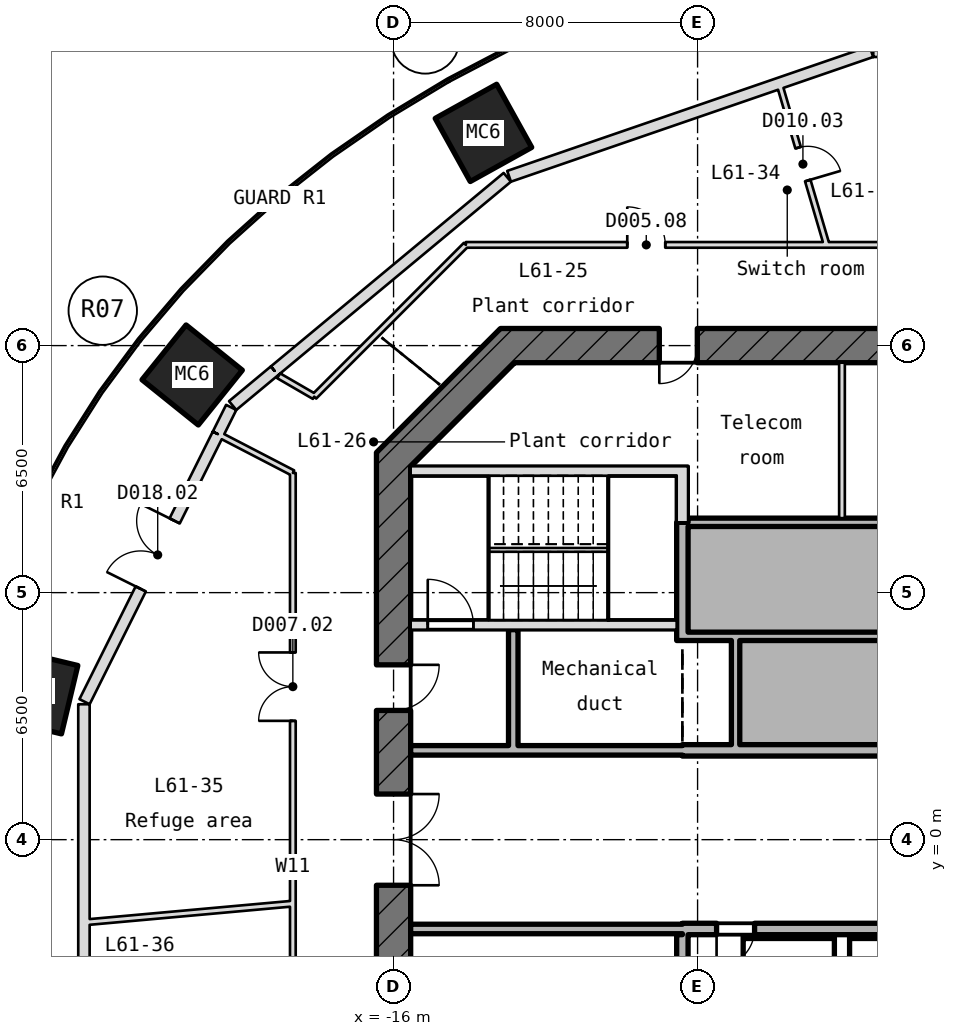
"""IFC4 building model, lengths in metres.
Left out: names, types, materials, properties, quantities, classifications, styles, units other than length and angle.
Written with IfcOpenShell. Run it as: python <this file> out.ifc"""

import sys

from ifc_helpers import new_model, si_unit, direction, frame, frame_2d, origin, place, context, subcontext, project, spatial, polyline, rectangle, outline, extrude, element, fill, save


model = new_model("IFC4")
c1 = context("Model", 3, precision=1e-05, world=origin(), true_north=direction((0.0, 1.0)))
c2 = subcontext(c1, "Body", "Model", "MODEL_VIEW")
j1 = project(units=[si_unit("LENGTHUNIT", "METRE"), si_unit("PLANEANGLEUNIT", "RADIAN")], contexts=[c1])
p1 = place(None, origin())
s1 = spatial("IfcSite", under=j1, at=p1, CompositionType="ELEMENT")
p2 = place(p1, origin())
s2 = spatial("IfcBuilding", under=s1, at=p2, CompositionType="ELEMENT")
p3 = place(p2, frame((0.0, 0.0, 273.1)))
s3 = spatial("IfcBuildingStorey", under=s2, at=p3, CompositionType="ELEMENT", Elevation=273.1)
p4 = place(p3, frame((0.0, 0.0, -0.3)))
e1 = element("IfcColumn", 1, at=p4, inside=s3, PredefinedType="COLUMN", context=c2, shape_type="SweptSolid", body=[
    extrude(outline(polyline([(-13.982, 17.317), (-15.936, 18.514), (-16.858, 20.175), (-15.241, 21.073), (-13.287, 19.877), (-12.365, 18.216), (-13.982, 17.317)])), origin(), (0.0, 0.0, 1.0), 6.05),
])
p5 = place(p3, frame((0.0, 0.0, -0.3)))
e2 = element("IfcColumn", 2, at=p5, inside=s3, PredefinedType="COLUMN", context=c2, shape_type="SweptSolid", body=[
    extrude(outline(polyline([(-21.138, 10.911), (-22.97, 12.208), (-24.451, 13.399), (-23.292, 14.84), (-21.46, 13.543), (-19.979, 12.353), (-21.138, 10.911)])), origin(), (0.0, 0.0, 1.0), 6.05),
])
p6 = place(p3, frame((0.0, 0.0, -0.3)))
e3 = element("IfcColumn", 3, at=p6, inside=s3, PredefinedType="COLUMN", context=c2, shape_type="SweptSolid", body=[
    extrude(outline(polyline([(-24.739, 2.783), (-26.586, 3.226), (-28.352, 4.655), (-27.921, 6.454), (-26.073, 6.011), (-24.308, 4.583), (-24.739, 2.783)])), origin(), (0.0, 0.0, 1.0), 6.05),
])
p7 = place(p3, frame((0.0, 0.0, -0.3)))
e4 = element("IfcColumn", 4, at=p7, inside=s3, PredefinedType="COLUMN", context=c2, shape_type="SweptSolid", body=[
    extrude(outline(polyline([(-26.156, -6.225), (-27.921, -4.654), (-28.352, -2.854), (-26.504, -2.412), (-24.739, -3.983), (-24.308, -5.783), (-26.156, -6.225)])), origin(), (0.0, 0.0, 1.0), 6.05),
])
p8 = place(p3, frame((13.186, 13.0, -0.3), z_axis=(0.0, 0.0, 1.0), x_axis=(-1.0, 0.0, 0.0)))
e5 = element("IfcWall", 5, at=p8, inside=s3, PredefinedType="SHEAR", context=c2, shape_type="SweptSolid", body=[
    extrude(rectangle(XDim=26.373, YDim=0.9, at=frame_2d((13.186, 0.0))), origin(), (0.0, 0.0, 1.0), 6.05),
])
p9 = place(p8, frame((21.193, 0.0, 0.3)))
e6 = element("IfcOpeningElement", 6, at=p9, cuts=e5, PredefinedType="OPENING", context=c2, shape_type="SweptSolid", body=[
    extrude(rectangle(XDim=1.0, YDim=2.1, at=frame_2d((0.5, 1.05))), frame((0.0, 0.46, 0.0), z_axis=(0.0, -1.0, 0.0), x_axis=(1.0, 0.0, 0.0)), (0.0, 0.0, 1.0), 0.92),
])
p10 = place(p8, frame((8.379, 0.0, 0.3)))
e7 = element("IfcOpeningElement", 7, at=p10, cuts=e5, PredefinedType="OPENING", context=c2, shape_type="SweptSolid", body=[
    extrude(rectangle(XDim=1.0, YDim=2.1, at=frame_2d((0.5, 1.05))), frame((0.0, 0.46, 0.0), z_axis=(0.0, -1.0, 0.0), x_axis=(1.0, 0.0, 0.0)), (0.0, 0.0, 1.0), 0.92),
])
p11 = place(p3, frame((-12.868, 13.132, -0.3), z_axis=(0.0, 0.0, 1.0), x_axis=(-0.707106781187, -0.707106781187, 0.0)))
e8 = element("IfcWall", 8, at=p11, inside=s3, PredefinedType="SHEAR", context=c2, shape_type="SweptSolid", body=[
    extrude(rectangle(XDim=4.615, YDim=0.9, at=frame_2d((2.308, 0.0))), origin(), (0.0, 0.0, 1.0), 6.05),
])
p12 = place(p3, frame((-16.0, 10.186, -0.3), z_axis=(0.0, 0.0, 1.0), x_axis=(0.0, -1.0, 0.0)))
e9 = element("IfcWall", 9, at=p12, inside=s3, PredefinedType="SHEAR", context=c2, shape_type="SweptSolid", body=[
    extrude(rectangle(XDim=20.373, YDim=0.9, at=frame_2d((10.186, 0.0))), origin(), (0.0, 0.0, 1.0), 6.05),
])
p13 = place(p12, frame((8.986, 0.0, 0.3)))
e10 = element("IfcOpeningElement", 10, at=p13, cuts=e9, PredefinedType="OPENING", context=c2, shape_type="SweptSolid", body=[
    extrude(rectangle(XDim=2.4, YDim=2.1, at=frame_2d((1.2, 1.05))), frame((0.0, 0.46, 0.0), z_axis=(0.0, -1.0, 0.0), x_axis=(1.0, 0.0, 0.0)), (0.0, 0.0, 1.0), 0.92),
])
p14 = place(p12, frame((5.586, 0.0, 0.3)))
e11 = element("IfcOpeningElement", 11, at=p14, cuts=e9, PredefinedType="OPENING", context=c2, shape_type="SweptSolid", body=[
    extrude(rectangle(XDim=1.2, YDim=2.1, at=frame_2d((0.6, 1.05))), frame((0.0, 0.46, 0.0), z_axis=(0.0, -1.0, 0.0), x_axis=(1.0, 0.0, 0.0)), (0.0, 0.0, 1.0), 0.92),
])
p15 = place(p3, frame((-15.55, -2.35, 0.0), z_axis=(0.0, 0.0, 1.0), x_axis=(1.0, 0.0, 0.0)))
e12 = element("IfcWall", 12, at=p15, inside=s3, PredefinedType="STANDARD", context=c2, shape_type="SweptSolid", body=[
    extrude(rectangle(XDim=7.15, YDim=0.25, at=frame_2d((3.575, 0.0))), origin(), (0.0, 0.0, 1.0), 5.75),
])
p16 = place(p3, frame((-8.4, -2.35, -0.3), z_axis=(0.0, 0.0, 1.0), x_axis=(1.0, 0.0, 0.0)))
e13 = element("IfcWall", 13, at=p16, inside=s3, PredefinedType="SHEAR", context=c2, shape_type="SweptSolid", body=[
    extrude(rectangle(XDim=16.8, YDim=0.3, at=frame_2d((8.4, 0.0))), origin(), (0.0, 0.0, 1.0), 6.05),
])
p17 = place(p16, frame((0.9, 0.0, 0.3)))
e14 = element("IfcOpeningElement", 14, at=p17, cuts=e13, PredefinedType="OPENING", context=c2, shape_type="SweptSolid", body=[
    extrude(rectangle(XDim=1.0, YDim=2.1, at=frame_2d((0.5, 1.05))), frame((0.0, 0.16, 0.0), z_axis=(0.0, -1.0, 0.0), x_axis=(1.0, 0.0, 0.0)), (0.0, 0.0, 1.0), 0.32),
])
p18 = place(p16, frame((14.9, 0.0, 0.3)))
e15 = element("IfcOpeningElement", 15, at=p18, cuts=e13, PredefinedType="OPENING", context=c2, shape_type="SweptSolid", body=[
    extrude(rectangle(XDim=1.0, YDim=2.1, at=frame_2d((0.5, 1.05))), frame((0.0, 0.16, 0.0), z_axis=(0.0, -1.0, 0.0), x_axis=(1.0, 0.0, 0.0)), (0.0, 0.0, 1.0), 0.32),
])
p19 = place(p3, frame((-15.55, 2.35, 0.0), z_axis=(0.0, 0.0, 1.0), x_axis=(1.0, 0.0, 0.0)))
e16 = element("IfcWall", 16, at=p19, inside=s3, PredefinedType="STANDARD", context=c2, shape_type="SweptSolid", body=[
    extrude(rectangle(XDim=7.15, YDim=0.25, at=frame_2d((3.575, 0.0))), origin(), (0.0, 0.0, 1.0), 5.75),
])
p20 = place(p3, frame((-8.4, 2.35, -0.3), z_axis=(0.0, 0.0, 1.0), x_axis=(1.0, 0.0, 0.0)))
e17 = element("IfcWall", 17, at=p20, inside=s3, PredefinedType="SHEAR", context=c2, shape_type="SweptSolid", body=[
    extrude(rectangle(XDim=16.8, YDim=0.3, at=frame_2d((8.4, 0.0))), origin(), (0.0, 0.0, 1.0), 6.05),
])
p21 = place(p3, frame((-8.25, 5.35, 0.0), z_axis=(0.0, 0.0, 1.0), x_axis=(1.0, 0.0, 0.0)))
e18 = element("IfcWall", 18, at=p21, inside=s3, PredefinedType="STANDARD", context=c2, shape_type="SweptSolid", body=[
    extrude(rectangle(XDim=16.5, YDim=0.22, at=frame_2d((8.25, 0.0))), origin(), (0.0, 0.0, 1.0), 5.75),
])
p22 = place(p3, frame((-15.55, 5.65, -0.3), z_axis=(0.0, 0.0, 1.0), x_axis=(1.0, 0.0, 0.0)))
e19 = element("IfcWall", 19, at=p22, inside=s3, PredefinedType="SHEAR", context=c2, shape_type="SweptSolid", body=[
    extrude(rectangle(XDim=7.0, YDim=0.25, at=frame_2d((3.5, 0.0))), origin(), (0.0, 0.0, 1.0), 6.05),
])
p23 = place(p22, frame((0.45, 0.0, 0.3)))
e20 = element("IfcOpeningElement", 20, at=p23, cuts=e19, PredefinedType="OPENING", context=c2, shape_type="SweptSolid", body=[
    extrude(rectangle(XDim=1.2, YDim=2.1, at=frame_2d((0.6, 1.05))), frame((0.0, 0.135, 0.0), z_axis=(0.0, -1.0, 0.0), x_axis=(1.0, 0.0, 0.0)), (0.0, 0.0, 1.0), 0.27),
])
p24 = place(p3, frame((-8.25, 8.35, 0.0), z_axis=(0.0, 0.0, 1.0), x_axis=(1.0, 0.0, 0.0)))
e21 = element("IfcWall", 21, at=p24, inside=s3, PredefinedType="STANDARD", context=c2, shape_type="SweptSolid", body=[
    extrude(rectangle(XDim=16.5, YDim=0.22, at=frame_2d((8.25, 0.0))), origin(), (0.0, 0.0, 1.0), 5.75),
])
p25 = place(p3, frame((-15.55, 9.7, -0.3), z_axis=(0.0, 0.0, 1.0), x_axis=(1.0, 0.0, 0.0)))
e22 = element("IfcWall", 22, at=p25, inside=s3, PredefinedType="SHEAR", context=c2, shape_type="SweptSolid", body=[
    extrude(rectangle(XDim=7.0, YDim=0.25, at=frame_2d((3.5, 0.0))), origin(), (0.0, 0.0, 1.0), 6.05),
])
p26 = place(p3, frame((-12.85, 2.475, 0.0), z_axis=(0.0, 0.0, 1.0), x_axis=(0.0, 1.0, 0.0)))
e23 = element("IfcWall", 23, at=p26, inside=s3, PredefinedType="STANDARD", context=c2, shape_type="SweptSolid", body=[
    extrude(rectangle(XDim=3.05, YDim=0.25, at=frame_2d((1.525, 0.0))), origin(), (0.0, 0.0, 1.0), 5.75),
])
p27 = place(p3, frame((-8.4, -8.75, -0.3), z_axis=(0.0, 0.0, 1.0), x_axis=(0.0, 1.0, 0.0)))
e24 = element("IfcWall", 24, at=p27, inside=s3, PredefinedType="SHEAR", context=c2, shape_type="SweptSolid", body=[
    extrude(rectangle(XDim=6.25, YDim=0.3, at=frame_2d((3.125, 0.0))), origin(), (0.0, 0.0, 1.0), 6.05),
])
p28 = place(p3, frame((-8.4, 5.24, -0.3), z_axis=(0.0, 0.0, 1.0), x_axis=(0.0, 1.0, 0.0)))
e25 = element("IfcWall", 25, at=p28, inside=s3, PredefinedType="SHEAR", context=c2, shape_type="SweptSolid", body=[
    extrude(rectangle(XDim=3.11, YDim=0.3, at=frame_2d((1.555, 0.0))), origin(), (0.0, 0.0, 1.0), 6.05),
])
p29 = place(p3, frame((-8.4, 8.35, -0.3), z_axis=(0.0, 0.0, 1.0), x_axis=(0.0, 1.0, 0.0)))
e26 = element("IfcWall", 26, at=p29, inside=s3, PredefinedType="SHEAR", context=c2, shape_type="SweptSolid", body=[
    extrude(rectangle(XDim=1.475, YDim=0.3, at=frame_2d((0.737, 0.0))), origin(), (0.0, 0.0, 1.0), 6.05),
])
p30 = place(p3, frame((-7.0, 2.5, 0.0), z_axis=(0.0, 0.0, 1.0), x_axis=(0.0, 1.0, 0.0)))
e27 = element("IfcWall", 27, at=p30, inside=s3, PredefinedType="STANDARD", context=c2, shape_type="SweptSolid", body=[
    extrude(rectangle(XDim=2.74, YDim=0.22, at=frame_2d((1.37, 0.0))), origin(), (0.0, 0.0, 1.0), 5.75),
])
p31 = place(p3, frame((-4.2, 8.46, 0.0), z_axis=(0.0, 0.0, 1.0), x_axis=(0.0, 1.0, 0.0)))
e28 = element("IfcWall", 28, at=p31, inside=s3, PredefinedType="PARTITIONING", context=c2, shape_type="SweptSolid", body=[
    extrude(rectangle(XDim=4.09, YDim=0.15, at=frame_2d((2.045, 0.0))), origin(), (0.0, 0.0, 1.0), 5.75),
])
p32 = place(p3, frame((-3.377, 20.744, 0.0), z_axis=(0.0, 0.0, 1.0), x_axis=(1.0, 0.0, 0.0)))
e29 = element("IfcWall", 29, at=p32, inside=s3, PredefinedType="STANDARD", context=c2, shape_type="SweptSolid", body=[
    extrude(rectangle(XDim=10.354, YDim=0.3, at=frame_2d((5.177, 0.0))), origin(), (0.0, 0.0, 1.0), 5.75),
])
p33 = place(p32, frame((3.737, 0.0, 0.0)))
e30 = element("IfcOpeningElement", 30, at=p33, cuts=e29, PredefinedType="OPENING", context=c2, shape_type="SweptSolid", body=[
    extrude(rectangle(XDim=2.0, YDim=2.1, at=frame_2d((1.0, 1.05))), frame((0.0, 0.16, 0.0), z_axis=(0.0, -1.0, 0.0), x_axis=(1.0, 0.0, 0.0)), (0.0, 0.0, 1.0), 0.32),
])
p34 = place(p3, frame((-12.96, 17.454, 0.0), z_axis=(0.0, 0.0, 1.0), x_axis=(0.945548580173, 0.325481001799, 0.0)))
e31 = element("IfcWall", 31, at=p34, inside=s3, PredefinedType="STANDARD", context=c2, shape_type="SweptSolid", body=[
    extrude(rectangle(XDim=10.083, YDim=0.3, at=frame_2d((5.042, 0.0))), origin(), (0.0, 0.0, 1.0), 5.75),
])
p35 = place(p3, frame((-19.133, 12.337, 0.0), z_axis=(0.0, 0.0, 1.0), x_axis=(0.769069827142, 0.639164768257, 0.0)))
e32 = element("IfcWall", 32, at=p35, inside=s3, PredefinedType="STANDARD", context=c2, shape_type="SweptSolid", body=[
    extrude(rectangle(XDim=7.965, YDim=0.3, at=frame_2d((3.982, 0.0))), origin(), (0.0, 0.0, 1.0), 5.75),
])
p36 = place(p3, frame((-24.131, 3.63, 0.0), z_axis=(0.0, 0.0, 1.0), x_axis=(0.446058739895, 0.895003687458, 0.0)))
e33 = element("IfcWall", 33, at=p36, inside=s3, PredefinedType="STANDARD", context=c2, shape_type="SweptSolid", body=[
    extrude(rectangle(XDim=7.867, YDim=0.3, at=frame_2d((3.933, 0.0))), origin(), (0.0, 0.0, 1.0), 5.75),
])
p37 = place(p36, frame((3.316, 0.0, 0.0)))
e34 = element("IfcOpeningElement", 34, at=p37, cuts=e33, PredefinedType="OPENING", context=c2, shape_type="SweptSolid", body=[
    extrude(rectangle(XDim=2.0, YDim=2.1, at=frame_2d((1.0, 1.05))), frame((0.0, 0.16, 0.0), z_axis=(0.0, -1.0, 0.0), x_axis=(1.0, 0.0, 0.0)), (0.0, 0.0, 1.0), 0.32),
])
p38 = place(p3, frame((-24.147, -4.763, 0.0), z_axis=(0.0, 0.0, 1.0), x_axis=(0.0, 1.0, 0.0)))
e35 = element("IfcWall", 35, at=p38, inside=s3, PredefinedType="STANDARD", context=c2, shape_type="SweptSolid", body=[
    extrude(rectangle(XDim=8.326, YDim=0.3, at=frame_2d((4.163, 0.0))), origin(), (0.0, 0.0, 1.0), 5.75),
])
p39 = place(p3, frame((-20.233, 11.422, 0.0), z_axis=(0.0, 0.0, 1.0), x_axis=(0.769115538699, 0.639109762193, 0.0)))
e36 = element("IfcWall", 36, at=p39, inside=s3, PredefinedType="STANDARD", context=c2, shape_type="SweptSolid", body=[
    extrude(rectangle(XDim=1.431, YDim=0.3, at=frame_2d((0.715, 0.0))), origin(), (0.0, 0.0, 1.0), 5.75),
])
p40 = place(p3, frame((-20.622, 10.671, 0.0), z_axis=(0.0, 0.0, 1.0), x_axis=(0.446218959337, 0.89492381817, 0.0)))
e37 = element("IfcWall", 37, at=p40, inside=s3, PredefinedType="STANDARD", context=c2, shape_type="SweptSolid", body=[
    extrude(rectangle(XDim=0.786, YDim=0.3, at=frame_2d((0.393, 0.0))), origin(), (0.0, 0.0, 1.0), 5.75),
])
p41 = place(p3, frame((-14.098, 15.65, 0.0), z_axis=(0.0, 0.0, 1.0), x_axis=(1.0, 0.0, 0.0)))
e38 = element("IfcWall", 38, at=p41, inside=s3, PredefinedType="PARTITIONING", context=c2, shape_type="SweptSolid", body=[
    extrude(rectangle(XDim=28.195, YDim=0.15, at=frame_2d((14.098, 0.0))), origin(), (0.0, 0.0, 1.0), 5.75),
])
p42 = place(p41, frame((26.995, 0.0, 0.0)))
e39 = element("IfcOpeningElement", 39, at=p42, cuts=e38, PredefinedType="OPENING", context=c2, shape_type="SweptSolid", body=[
    extrude(rectangle(XDim=0.9, YDim=2.1, at=frame_2d((0.45, 1.05))), frame((0.0, 0.085, 0.0), z_axis=(0.0, -1.0, 0.0), x_axis=(1.0, 0.0, 0.0)), (0.0, 0.0, 1.0), 0.17),
])
p43 = place(p41, frame((17.592, 0.0, 0.0)))
e40 = element("IfcOpeningElement", 40, at=p43, cuts=e38, PredefinedType="OPENING", context=c2, shape_type="SweptSolid", body=[
    extrude(rectangle(XDim=1.8, YDim=2.1, at=frame_2d((0.9, 1.05))), frame((0.0, 0.085, 0.0), z_axis=(0.0, -1.0, 0.0), x_axis=(1.0, 0.0, 0.0)), (0.0, 0.0, 1.0), 0.17),
])
p44 = place(p41, frame((4.248, 0.0, 0.0)))
e41 = element("IfcOpeningElement", 41, at=p44, cuts=e38, PredefinedType="OPENING", context=c2, shape_type="SweptSolid", body=[
    extrude(rectangle(XDim=1.0, YDim=2.1, at=frame_2d((0.5, 1.05))), frame((0.0, 0.085, 0.0), z_axis=(0.0, -1.0, 0.0), x_axis=(1.0, 0.0, 0.0)), (0.0, 0.0, 1.0), 0.17),
])
p45 = place(p3, frame((-24.137, -2.177, 0.0), z_axis=(0.0, 0.0, 1.0), x_axis=(0.995957513346, 0.089825562115, 0.0)))
e42 = element("IfcWall", 42, at=p45, inside=s3, PredefinedType="PARTITIONING", context=c2, shape_type="SweptSolid", body=[
    extrude(rectangle(XDim=5.517, YDim=0.15, at=frame_2d((2.759, 0.0))), origin(), (0.0, 0.0, 1.0), 5.75),
])
p46 = place(p3, frame((-18.089, 11.658, 0.0), z_axis=(0.0, 0.0, 1.0), x_axis=(0.707106781187, 0.707106781187, 0.0)))
e43 = element("IfcWall", 43, at=p46, inside=s3, PredefinedType="PARTITIONING", context=c2, shape_type="SweptSolid", body=[
    extrude(rectangle(XDim=5.645, YDim=0.15, at=frame_2d((2.823, 0.0))), origin(), (0.0, 0.0, 1.0), 5.75),
])
p47 = place(p3, frame((-18.65, -11.098, 0.0), z_axis=(0.0, 0.0, 1.0), x_axis=(0.0, 1.0, 0.0)))
e44 = element("IfcWall", 44, at=p47, inside=s3, PredefinedType="PARTITIONING", context=c2, shape_type="SweptSolid", body=[
    extrude(rectangle(XDim=20.748, YDim=0.15, at=frame_2d((10.374, 0.0))), origin(), (0.0, 0.0, 1.0), 5.75),
])
p48 = place(p47, frame((14.224, 0.0, 0.0)))
e45 = element("IfcOpeningElement", 45, at=p48, cuts=e44, PredefinedType="OPENING", context=c2, shape_type="SweptSolid", body=[
    extrude(rectangle(XDim=1.8, YDim=2.1, at=frame_2d((0.9, 1.05))), frame((0.0, 0.085, 0.0), z_axis=(0.0, -1.0, 0.0), x_axis=(1.0, 0.0, 0.0)), (0.0, 0.0, 1.0), 0.17),
])
p49 = place(p47, frame((2.751, 0.0, 0.0)))
e46 = element("IfcOpeningElement", 46, at=p49, cuts=e44, PredefinedType="OPENING", context=c2, shape_type="SweptSolid", body=[
    extrude(rectangle(XDim=1.0, YDim=2.1, at=frame_2d((0.5, 1.05))), frame((0.0, 0.085, 0.0), z_axis=(0.0, -1.0, 0.0), x_axis=(1.0, 0.0, 0.0)), (0.0, 0.0, 1.0), 0.17),
])
p50 = place(p3, frame((-4.603, 15.65, 0.0), z_axis=(0.0, 0.0, 1.0), x_axis=(-0.282157374925, 0.959368133604, 0.0)))
e47 = element("IfcWall", 47, at=p50, inside=s3, PredefinedType="PARTITIONING", context=c2, shape_type="SweptSolid", body=[
    extrude(rectangle(XDim=4.431, YDim=0.15, at=frame_2d((2.215, 0.0))), origin(), (0.0, 0.0, 1.0), 5.75),
])
p51 = place(p50, frame((1.765, 0.0, 0.0)))
e48 = element("IfcOpeningElement", 48, at=p51, cuts=e47, PredefinedType="OPENING", context=c2, shape_type="SweptSolid", body=[
    extrude(rectangle(XDim=0.9, YDim=2.1, at=frame_2d((0.45, 1.05))), frame((0.0, 0.085, 0.0), z_axis=(0.0, -1.0, 0.0), x_axis=(1.0, 0.0, 0.0)), (0.0, 0.0, 1.0), 0.17),
])
p52 = place(p3, frame((-18.086, 11.662, 0.0), z_axis=(0.0, 0.0, 1.0), x_axis=(-0.864984308723, 0.501798909587, 0.0)))
e49 = element("IfcWall", 49, at=p52, inside=s3, PredefinedType="PARTITIONING", context=c2, shape_type="SweptSolid", body=[
    extrude(rectangle(XDim=1.085, YDim=0.15, at=frame_2d((0.542, 0.0))), origin(), (0.0, 0.0, 1.0), 5.75),
])
p53 = place(p3, frame((-18.65, 9.65, 0.0), z_axis=(0.0, 0.0, 1.0), x_axis=(-0.887711908644, 0.460399356267, 0.0)))
e50 = element("IfcWall", 50, at=p53, inside=s3, PredefinedType="PARTITIONING", context=c2, shape_type="SweptSolid", body=[
    extrude(rectangle(XDim=2.081, YDim=0.15, at=frame_2d((1.041, 0.0))), origin(), (0.0, 0.0, 1.0), 5.75),
])
p54 = place(p23, origin())
e51 = element("IfcDoor", 51, at=p54, inside=s3, OperationType="SINGLE_SWING_RIGHT", PredefinedType="DOOR", context=c2, shape_type="SweptSolid", body=[
    extrude(rectangle(XDim=1.2, YDim=2.1, at=frame_2d((0.6, 1.05))), frame((0.0, 0.025, 0.0), z_axis=(0.0, -1.0, 0.0), x_axis=(1.0, 0.0, 0.0)), (0.0, 0.0, 1.0), 0.05),
])
fill(e20, e51)
p55 = place(p13, origin())
e52 = element("IfcDoor", 52, at=p55, inside=s3, OperationType="DOUBLE_DOOR_SINGLE_SWING", PredefinedType="DOOR", context=c2, shape_type="SweptSolid", body=[
    extrude(rectangle(XDim=2.4, YDim=2.1, at=frame_2d((1.2, 1.05))), frame((0.0, 0.025, 0.0), z_axis=(0.0, -1.0, 0.0), x_axis=(1.0, 0.0, 0.0)), (0.0, 0.0, 1.0), 0.05),
])
fill(e10, e52)
p56 = place(p14, origin())
e53 = element("IfcDoor", 53, at=p56, inside=s3, OperationType="SINGLE_SWING_RIGHT", PredefinedType="DOOR", context=c2, shape_type="SweptSolid", body=[
    extrude(rectangle(XDim=1.2, YDim=2.1, at=frame_2d((0.6, 1.05))), frame((0.0, 0.025, 0.0), z_axis=(0.0, -1.0, 0.0), x_axis=(1.0, 0.0, 0.0)), (0.0, 0.0, 1.0), 0.05),
])
fill(e11, e53)
p57 = place(p17, frame((1.0, 0.0, 0.0), z_axis=(0.0, 0.0, 1.0), x_axis=(-1.0, 0.0, 0.0)))
e54 = element("IfcDoor", 54, at=p57, inside=s3, OperationType="SINGLE_SWING_LEFT", PredefinedType="DOOR", context=c2, shape_type="SweptSolid", body=[
    extrude(rectangle(XDim=1.0, YDim=2.1, at=frame_2d((0.5, 1.05))), frame((0.0, 0.025, 0.0), z_axis=(0.0, -1.0, 0.0), x_axis=(1.0, 0.0, 0.0)), (0.0, 0.0, 1.0), 0.05),
])
fill(e14, e54)
p58 = place(p9, origin())
e55 = element("IfcDoor", 55, at=p58, inside=s3, OperationType="SINGLE_SWING_RIGHT", PredefinedType="DOOR", context=c2, shape_type="SweptSolid", body=[
    extrude(rectangle(XDim=1.0, YDim=2.1, at=frame_2d((0.5, 1.05))), frame((0.0, 0.025, 0.0), z_axis=(0.0, -1.0, 0.0), x_axis=(1.0, 0.0, 0.0)), (0.0, 0.0, 1.0), 0.05),
])
fill(e6, e55)
p59 = place(p51, frame((0.9, 0.0, 0.0), z_axis=(0.0, 0.0, 1.0), x_axis=(-1.0, 0.0, 0.0)))
e56 = element("IfcDoor", 56, at=p59, inside=s3, OperationType="SINGLE_SWING_LEFT", PredefinedType="DOOR", context=c2, shape_type="SweptSolid", body=[
    extrude(rectangle(XDim=0.9, YDim=2.1, at=frame_2d((0.45, 1.05))), frame((0.0, 0.025, 0.0), z_axis=(0.0, -1.0, 0.0), x_axis=(1.0, 0.0, 0.0)), (0.0, 0.0, 1.0), 0.05),
])
fill(e48, e56)
p60 = place(p44, origin())
e57 = element("IfcDoor", 57, at=p60, inside=s3, OperationType="SINGLE_SWING_RIGHT", PredefinedType="DOOR", context=c2, shape_type="SweptSolid", body=[
    extrude(rectangle(XDim=1.0, YDim=2.1, at=frame_2d((0.5, 1.05))), frame((0.0, 0.025, 0.0), z_axis=(0.0, -1.0, 0.0), x_axis=(1.0, 0.0, 0.0)), (0.0, 0.0, 1.0), 0.05),
])
fill(e41, e57)
p61 = place(p48, origin())
e58 = element("IfcDoor", 58, at=p61, inside=s3, OperationType="DOUBLE_DOOR_SINGLE_SWING", PredefinedType="DOOR", context=c2, shape_type="SweptSolid", body=[
    extrude(rectangle(XDim=1.8, YDim=2.1, at=frame_2d((0.9, 1.05))), frame((0.0, 0.025, 0.0), z_axis=(0.0, -1.0, 0.0), x_axis=(1.0, 0.0, 0.0)), (0.0, 0.0, 1.0), 0.05),
])
fill(e45, e58)
p62 = place(p37, origin())
e59 = element("IfcDoor", 59, at=p62, inside=s3, OperationType="DOUBLE_DOOR_SINGLE_SWING", PredefinedType="DOOR", context=c2, shape_type="SweptSolid", body=[
    extrude(rectangle(XDim=2.0, YDim=2.1, at=frame_2d((1.0, 1.05))), frame((0.0, 0.025, 0.0), z_axis=(0.0, -1.0, 0.0), x_axis=(1.0, 0.0, 0.0)), (0.0, 0.0, 1.0), 0.05),
])
fill(e34, e59)
save(model, sys.argv[1])
